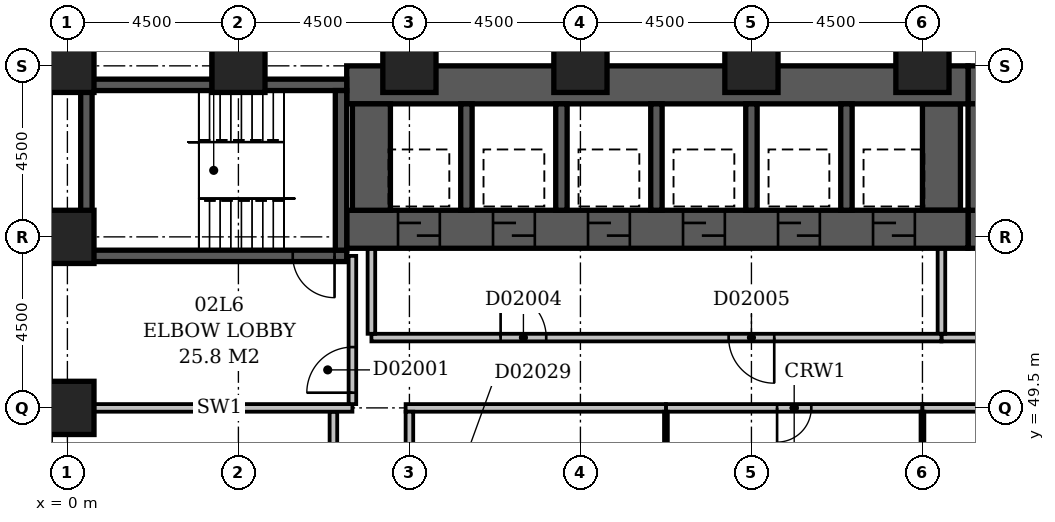
"""IFC4 building model, lengths in metres.
Left out: names, types, materials, properties, quantities, classifications, styles, units other than length and angle.
Written with IfcOpenShell. Run it as: python <this file> out.ifc"""

import sys

from ifc_helpers import new_model, si_unit, direction, frame, frame_2d, origin, origin_2d, place, context, subcontext, project, spatial, rectangle, extrude, element, fill, save


model = new_model("IFC4")
c1 = context("Model", 3, precision=1e-05, world=origin(), true_north=direction((0.0, 1.0)))
c2 = subcontext(c1, "Body", "Model", "MODEL_VIEW")
j1 = project(units=[si_unit("LENGTHUNIT", "METRE"), si_unit("PLANEANGLEUNIT", "RADIAN")], contexts=[c1])
p1 = place(None, origin())
s1 = spatial("IfcSite", under=j1, at=p1, CompositionType="ELEMENT")
p2 = place(p1, origin())
s2 = spatial("IfcBuilding", under=s1, at=p2, CompositionType="ELEMENT")
p3 = place(p2, frame((0.0, 0.0, 14.0)))
s3 = spatial("IfcBuildingStorey", under=s2, at=p3, CompositionType="ELEMENT", Elevation=14.0)
p4 = place(p3, frame((0.35, 53.5, -0.4), z_axis=(0.0, 0.0, 1.0), x_axis=(1.0, 0.0, 0.0)))
e1 = element("IfcWall", 1, at=p4, inside=s3, PredefinedType="SHEAR", context=c2, shape_type="SweptSolid", body=[
    extrude(rectangle(XDim=7.0, YDim=0.3, at=frame_2d((3.5, 0.0))), origin(), (0.0, 0.0, 1.0), 5.0),
])
p5 = place(p4, frame((5.58, 0.0, 0.4)))
e2 = element("IfcOpeningElement", 2, at=p5, cuts=e1, PredefinedType="OPENING", context=c2, shape_type="SweptSolid", body=[
    extrude(rectangle(XDim=1.1, YDim=2.1, at=frame_2d((0.55, 1.05))), frame((0.0, 0.162, 0.0), z_axis=(0.0, -1.0, 0.0), x_axis=(1.0, 0.0, 0.0)), (0.0, 0.0, 1.0), 0.324),
])
p6 = place(p3, frame((0.35, 58.0, -0.4), z_axis=(0.0, 0.0, 1.0), x_axis=(1.0, 0.0, 0.0)))
e3 = element("IfcWall", 3, at=p6, inside=s3, PredefinedType="SHEAR", context=c2, shape_type="SweptSolid", body=[
    extrude(rectangle(XDim=7.0, YDim=0.3, at=frame_2d((3.5, 0.0))), origin(), (0.0, 0.0, 1.0), 5.0),
])
for number, where, z_axis, x_axis in (
    (4, (0.5, 53.65, -0.4), (0.0, 0.0, 1.0), (0.0, 1.0, 0.0)),
    (5, (7.2, 53.65, -0.4), (0.0, 0.0, 1.0), (0.0, 1.0, 0.0)),
):
    element("IfcWall", number, at=place(p3, frame(where, z_axis=z_axis, x_axis=x_axis)), inside=s3, PredefinedType="SHEAR", context=c2, shape_type="SweptSolid", body=[
        extrude(rectangle(XDim=4.2, YDim=0.3, at=frame_2d((2.1, 0.0))), origin(), (0.0, 0.0, 1.0), 5.0),
    ])
p7 = place(p3, frame((7.35, 54.2, -0.4), z_axis=(0.0, 0.0, 1.0), x_axis=(1.0, 0.0, 0.0)))
e6 = element("IfcWall", 6, at=p7, inside=s3, PredefinedType="SHEAR", context=c2, shape_type="SweptSolid", body=[
    extrude(rectangle(XDim=16.35, YDim=1.0, at=frame_2d((8.175, 0.0))), origin(), (0.0, 0.0, 1.0), 5.0),
])
p8 = place(p7, frame((1.35, 0.0, 0.4)))
e7 = element("IfcOpeningElement", 7, at=p8, cuts=e6, PredefinedType="OPENING", context=c2, shape_type="SweptSolid", body=[
    extrude(rectangle(XDim=1.1, YDim=2.1, at=frame_2d((0.55, 1.05))), frame((0.0, 0.512, 0.0), z_axis=(0.0, -1.0, 0.0), x_axis=(1.0, 0.0, 0.0)), (0.0, 0.0, 1.0), 1.024),
])
p9 = place(p7, frame((3.85, 0.0, 0.4)))
e8 = element("IfcOpeningElement", 8, at=p9, cuts=e6, PredefinedType="OPENING", context=c2, shape_type="SweptSolid", body=[
    extrude(rectangle(XDim=1.1, YDim=2.1, at=frame_2d((0.55, 1.05))), frame((0.0, 0.512, 0.0), z_axis=(0.0, -1.0, 0.0), x_axis=(1.0, 0.0, 0.0)), (0.0, 0.0, 1.0), 1.024),
])
p10 = place(p7, frame((6.35, 0.0, 0.4)))
e9 = element("IfcOpeningElement", 9, at=p10, cuts=e6, PredefinedType="OPENING", context=c2, shape_type="SweptSolid", body=[
    extrude(rectangle(XDim=1.1, YDim=2.1, at=frame_2d((0.55, 1.05))), frame((0.0, 0.512, 0.0), z_axis=(0.0, -1.0, 0.0), x_axis=(1.0, 0.0, 0.0)), (0.0, 0.0, 1.0), 1.024),
])
p11 = place(p7, frame((8.85, 0.0, 0.4)))
e10 = element("IfcOpeningElement", 10, at=p11, cuts=e6, PredefinedType="OPENING", context=c2, shape_type="SweptSolid", body=[
    extrude(rectangle(XDim=1.1, YDim=2.1, at=frame_2d((0.55, 1.05))), frame((0.0, 0.512, 0.0), z_axis=(0.0, -1.0, 0.0), x_axis=(1.0, 0.0, 0.0)), (0.0, 0.0, 1.0), 1.024),
])
p12 = place(p7, frame((11.35, 0.0, 0.4)))
e11 = element("IfcOpeningElement", 11, at=p12, cuts=e6, PredefinedType="OPENING", context=c2, shape_type="SweptSolid", body=[
    extrude(rectangle(XDim=1.1, YDim=2.1, at=frame_2d((0.55, 1.05))), frame((0.0, 0.512, 0.0), z_axis=(0.0, -1.0, 0.0), x_axis=(1.0, 0.0, 0.0)), (0.0, 0.0, 1.0), 1.024),
])
p13 = place(p7, frame((13.85, 0.0, 0.4)))
e12 = element("IfcOpeningElement", 12, at=p13, cuts=e6, PredefinedType="OPENING", context=c2, shape_type="SweptSolid", body=[
    extrude(rectangle(XDim=1.1, YDim=2.1, at=frame_2d((0.55, 1.05))), frame((0.0, 0.512, 0.0), z_axis=(0.0, -1.0, 0.0), x_axis=(1.0, 0.0, 0.0)), (0.0, 0.0, 1.0), 1.024),
])
p14 = place(p3, frame((7.35, 58.0, -0.4), z_axis=(0.0, 0.0, 1.0), x_axis=(1.0, 0.0, 0.0)))
e13 = element("IfcWall", 13, at=p14, inside=s3, PredefinedType="SHEAR", context=c2, shape_type="SweptSolid", body=[
    extrude(rectangle(XDim=16.35, YDim=1.0, at=frame_2d((8.175, 0.0))), origin(), (0.0, 0.0, 1.0), 5.0),
])
p15 = place(p3, frame((8.0, 54.7, -0.4), z_axis=(0.0, 0.0, 1.0), x_axis=(0.0, 1.0, 0.0)))
e14 = element("IfcWall", 14, at=p15, inside=s3, PredefinedType="SHEAR", context=c2, shape_type="SweptSolid", body=[
    extrude(rectangle(XDim=2.8, YDim=1.0, at=frame_2d((1.4, 0.0))), origin(), (0.0, 0.0, 1.0), 5.0),
])
for number, where, z_axis, x_axis in (
    (15, (10.5, 54.7, -0.4), (0.0, 0.0, 1.0), (0.0, 1.0, 0.0)),
    (16, (13.0, 54.7, -0.4), (0.0, 0.0, 1.0), (0.0, 1.0, 0.0)),
    (17, (15.5, 54.7, -0.4), (0.0, 0.0, 1.0), (0.0, 1.0, 0.0)),
    (18, (18.0, 54.7, -0.4), (0.0, 0.0, 1.0), (0.0, 1.0, 0.0)),
    (19, (20.5, 54.7, -0.4), (0.0, 0.0, 1.0), (0.0, 1.0, 0.0)),
):
    element("IfcWall", number, at=place(p3, frame(where, z_axis=z_axis, x_axis=x_axis)), inside=s3, PredefinedType="SHEAR", context=c2, shape_type="SweptSolid", body=[
        extrude(rectangle(XDim=2.8, YDim=0.3, at=frame_2d((1.4, 0.0))), origin(), (0.0, 0.0, 1.0), 5.0),
    ])
p16 = place(p3, frame((23.0, 54.7, -0.4), z_axis=(0.0, 0.0, 1.0), x_axis=(0.0, 1.0, 0.0)))
e20 = element("IfcWall", 20, at=p16, inside=s3, PredefinedType="SHEAR", context=c2, shape_type="SweptSolid", body=[
    extrude(rectangle(XDim=2.8, YDim=1.0, at=frame_2d((1.4, 0.0))), origin(), (0.0, 0.0, 1.0), 5.0),
])
p17 = place(p3, frame((23.7, 54.2, -0.4), z_axis=(0.0, 0.0, 1.0), x_axis=(1.0, 0.0, 0.0)))
e21 = element("IfcWall", 21, at=p17, inside=s3, PredefinedType="SHEAR", context=c2, shape_type="SweptSolid", body=[
    extrude(rectangle(XDim=3.5, YDim=1.0, at=frame_2d((1.75, 0.0))), origin(), (0.0, 0.0, 1.0), 5.0),
])
p18 = place(p17, frame((1.2, 0.0, 0.4)))
e22 = element("IfcOpeningElement", 22, at=p18, cuts=e21, PredefinedType="OPENING", context=c2, shape_type="SweptSolid", body=[
    extrude(rectangle(XDim=1.1, YDim=2.1, at=frame_2d((0.55, 1.05))), frame((0.0, 0.512, 0.0), z_axis=(0.0, -1.0, 0.0), x_axis=(1.0, 0.0, 0.0)), (0.0, 0.0, 1.0), 1.024),
])
p19 = place(p3, frame((23.7, 58.0, -0.4), z_axis=(0.0, 0.0, 1.0), x_axis=(1.0, 0.0, 0.0)))
e23 = element("IfcWall", 23, at=p19, inside=s3, PredefinedType="SHEAR", context=c2, shape_type="SweptSolid", body=[
    extrude(rectangle(XDim=3.5, YDim=1.0, at=frame_2d((1.75, 0.0))), origin(), (0.0, 0.0, 1.0), 5.0),
])
p20 = place(p3, frame((24.2, 54.7, -0.4), z_axis=(0.0, 0.0, 1.0), x_axis=(0.0, 1.0, 0.0)))
e24 = element("IfcWall", 24, at=p20, inside=s3, PredefinedType="SHEAR", context=c2, shape_type="SweptSolid", body=[
    extrude(rectangle(XDim=2.8, YDim=1.0, at=frame_2d((1.4, 0.0))), origin(), (0.0, 0.0, 1.0), 5.0),
])
for number, where, z_axis, x_axis in (
    (25, (0.0, 49.5, -0.4), (0.0, 0.0, 1.0), (1.0, 0.0, 0.0)),
    (26, (0.0, 54.0, -0.4), (0.0, 0.0, 1.0), (1.0, 0.0, 0.0)),
    (27, (0.0, 58.5, -0.4), (0.0, 0.0, 1.0), (1.0, 0.0, 0.0)),
    (28, (4.5, 58.5, -0.4), (0.0, 0.0, 1.0), (1.0, 0.0, 0.0)),
    (29, (9.0, 58.5, -0.4), (0.0, 0.0, 1.0), (1.0, 0.0, 0.0)),
    (30, (13.5, 58.5, -0.4), (0.0, 0.0, 1.0), (1.0, 0.0, 0.0)),
    (31, (18.0, 58.5, -0.4), (0.0, 0.0, 1.0), (1.0, 0.0, 0.0)),
    (32, (22.5, 58.5, -0.4), (0.0, 0.0, 1.0), (1.0, 0.0, 0.0)),
):
    element("IfcColumn", number, at=place(p3, frame(where, z_axis=z_axis, x_axis=x_axis)), inside=s3, PredefinedType="COLUMN", context=c2, shape_type="SweptSolid", body=[
        extrude(rectangle(XDim=1.4, YDim=1.4, at=origin_2d()), origin(), (0.0, 0.0, 1.0), 5.0),
    ])
p21 = place(p3, frame((8.0, 51.35, 0.0), z_axis=(0.0, 0.0, 1.0), x_axis=(1.0, 0.0, 0.0)))
e33 = element("IfcWall", 33, at=p21, inside=s3, PredefinedType="PARTITIONING", context=c2, shape_type="SweptSolid", body=[
    extrude(rectangle(XDim=15.0, YDim=0.2, at=frame_2d((7.5, 0.0))), origin(), (0.0, 0.0, 1.0), 4.6),
])
p22 = place(p21, frame((3.4, 0.0, 0.0)))
e34 = element("IfcOpeningElement", 34, at=p22, cuts=e33, PredefinedType="OPENING", context=c2, shape_type="SweptSolid", body=[
    extrude(rectangle(XDim=1.2, YDim=2.1, at=frame_2d((0.6, 1.05))), frame((0.0, 0.112, 0.0), z_axis=(0.0, -1.0, 0.0), x_axis=(1.0, 0.0, 0.0)), (0.0, 0.0, 1.0), 0.224),
])
p23 = place(p21, frame((9.4, 0.0, 0.0)))
e35 = element("IfcOpeningElement", 35, at=p23, cuts=e33, PredefinedType="OPENING", context=c2, shape_type="SweptSolid", body=[
    extrude(rectangle(XDim=1.2, YDim=2.1, at=frame_2d((0.6, 1.05))), frame((0.0, 0.112, 0.0), z_axis=(0.0, -1.0, 0.0), x_axis=(1.0, 0.0, 0.0)), (0.0, 0.0, 1.0), 0.224),
])
for number, where, z_axis, x_axis in (
    (36, (23.0, 51.45, 0.0), (0.0, 0.0, 1.0), (0.0, 1.0, 0.0)),
    (37, (8.0, 51.45, 0.0), (0.0, 0.0, 1.0), (0.0, 1.0, 0.0)),
):
    element("IfcWall", number, at=place(p3, frame(where, z_axis=z_axis, x_axis=x_axis)), inside=s3, PredefinedType="PARTITIONING", context=c2, shape_type="SweptSolid", body=[
        extrude(rectangle(XDim=2.23, YDim=0.2, at=frame_2d((1.115, 0.0))), origin(), (0.0, 0.0, 1.0), 4.6),
    ])
p24 = place(p3, frame((23.0, 51.35, 0.0), z_axis=(0.0, 0.0, 1.0), x_axis=(1.0, 0.0, 0.0)))
e38 = element("IfcWall", 38, at=p24, inside=s3, PredefinedType="PARTITIONING", context=c2, shape_type="SweptSolid", body=[
    extrude(rectangle(XDim=4.8, YDim=0.2, at=frame_2d((2.4, 0.0))), origin(), (0.0, 0.0, 1.0), 4.6),
])
p25 = place(p24, frame((1.65, 0.0, 0.0)))
e39 = element("IfcOpeningElement", 39, at=p25, cuts=e38, PredefinedType="OPENING", context=c2, shape_type="SweptSolid", body=[
    extrude(rectangle(XDim=1.2, YDim=2.1, at=frame_2d((0.6, 1.05))), frame((0.0, 0.112, 0.0), z_axis=(0.0, -1.0, 0.0), x_axis=(1.0, 0.0, 0.0)), (0.0, 0.0, 1.0), 0.224),
])
p26 = place(p3, frame((0.5, 49.5, 0.0), z_axis=(0.0, 0.0, 1.0), x_axis=(1.0, 0.0, 0.0)))
e40 = element("IfcWall", 40, at=p26, inside=s3, PredefinedType="PARTITIONING", context=c2, shape_type="SweptSolid", body=[
    extrude(rectangle(XDim=7.0, YDim=0.2, at=frame_2d((3.5, 0.0))), origin(), (0.0, 0.0, 1.0), 4.6),
])
p27 = place(p3, frame((7.5, 49.6, 0.0), z_axis=(0.0, 0.0, 1.0), x_axis=(0.0, 1.0, 0.0)))
e41 = element("IfcWall", 41, at=p27, inside=s3, PredefinedType="PARTITIONING", context=c2, shape_type="SweptSolid", body=[
    extrude(rectangle(XDim=3.9, YDim=0.2, at=frame_2d((1.95, 0.0))), origin(), (0.0, 0.0, 1.0), 4.6),
])
p28 = place(p27, frame((0.3, 0.0, 0.0)))
e42 = element("IfcOpeningElement", 42, at=p28, cuts=e41, PredefinedType="OPENING", context=c2, shape_type="SweptSolid", body=[
    extrude(rectangle(XDim=1.2, YDim=2.1, at=frame_2d((0.6, 1.05))), frame((0.0, 0.112, 0.0), z_axis=(0.0, -1.0, 0.0), x_axis=(1.0, 0.0, 0.0)), (0.0, 0.0, 1.0), 0.224),
])
p29 = place(p3, frame((9.0, 42.5, 0.0), z_axis=(0.0, 0.0, 1.0), x_axis=(0.0, 1.0, 0.0)))
e43 = element("IfcWall", 43, at=p29, inside=s3, PredefinedType="PARTITIONING", context=c2, shape_type="SweptSolid", body=[
    extrude(rectangle(XDim=6.9, YDim=0.2, at=frame_2d((3.45, 0.0))), origin(), (0.0, 0.0, 1.0), 4.6),
])
p30 = place(p29, frame((2.975, 0.0, 0.0)))
e44 = element("IfcOpeningElement", 44, at=p30, cuts=e43, PredefinedType="OPENING", context=c2, shape_type="SweptSolid", body=[
    extrude(rectangle(XDim=0.9, YDim=2.1, at=frame_2d((0.45, 1.05))), frame((0.0, 0.112, 0.0), z_axis=(0.0, -1.0, 0.0), x_axis=(1.0, 0.0, 0.0)), (0.0, 0.0, 1.0), 0.224),
])
p31 = place(p3, frame((22.5, 42.55, 0.0), z_axis=(0.0, 0.0, 1.0), x_axis=(0.0, 1.0, 0.0)))
e45 = element("IfcWall", 45, at=p31, inside=s3, PredefinedType="PARTITIONING", context=c2, shape_type="SweptSolid", body=[
    extrude(rectangle(XDim=6.85, YDim=0.1, at=frame_2d((3.425, 0.0))), origin(), (0.0, 0.0, 1.0), 4.6),
])
p32 = place(p3, frame((7.0, 49.4, 0.0), z_axis=(0.0, 0.0, 1.0), x_axis=(0.0, -1.0, 0.0)))
e46 = element("IfcWall", 46, at=p32, inside=s3, PredefinedType="PARTITIONING", context=c2, shape_type="SweptSolid", body=[
    extrude(rectangle(XDim=6.4, YDim=0.2, at=frame_2d((3.2, 0.0))), origin(), (0.0, 0.0, 1.0), 4.6),
])
p33 = place(p32, frame((2.775, 0.0, 0.0)))
e47 = element("IfcOpeningElement", 47, at=p33, cuts=e46, PredefinedType="OPENING", context=c2, shape_type="SweptSolid", body=[
    extrude(rectangle(XDim=0.9, YDim=2.1, at=frame_2d((0.45, 1.05))), frame((0.0, 0.112, 0.0), z_axis=(0.0, -1.0, 0.0), x_axis=(1.0, 0.0, 0.0)), (0.0, 0.0, 1.0), 0.224),
])
p34 = place(p3, frame((8.9, 49.5, 0.0), z_axis=(0.0, 0.0, 1.0), x_axis=(1.0, 0.0, 0.0)))
e48 = element("IfcWall", 48, at=p34, inside=s3, PredefinedType="PARTITIONING", context=c2, shape_type="SweptSolid", body=[
    extrude(rectangle(XDim=6.85, YDim=0.2, at=frame_2d((3.425, 0.0))), origin(), (0.0, 0.0, 1.0), 4.6),
])
p35 = place(p3, frame((15.75, 49.4, 0.0), z_axis=(0.0, 0.0, 1.0), x_axis=(0.0, -1.0, 0.0)))
e49 = element("IfcWall", 49, at=p35, inside=s3, PredefinedType="PARTITIONING", context=c2, shape_type="SweptSolid", body=[
    extrude(rectangle(XDim=6.95, YDim=0.1, at=frame_2d((3.475, 0.0))), origin(), (0.0, 0.0, 1.0), 4.6),
])
p36 = place(p3, frame((15.75, 49.5, 0.0), z_axis=(0.0, 0.0, 1.0), x_axis=(1.0, 0.0, 0.0)))
e50 = element("IfcWall", 50, at=p36, inside=s3, PredefinedType="PARTITIONING", context=c2, shape_type="SweptSolid", body=[
    extrude(rectangle(XDim=6.75, YDim=0.2, at=frame_2d((3.375, 0.0))), origin(), (0.0, 0.0, 1.0), 4.6),
])
p37 = place(p36, frame((2.925, 0.0, 0.0)))
e51 = element("IfcOpeningElement", 51, at=p37, cuts=e50, PredefinedType="OPENING", context=c2, shape_type="SweptSolid", body=[
    extrude(rectangle(XDim=0.9, YDim=2.1, at=frame_2d((0.45, 1.05))), frame((0.0, 0.112, 0.0), z_axis=(0.0, -1.0, 0.0), x_axis=(1.0, 0.0, 0.0)), (0.0, 0.0, 1.0), 0.224),
])
p38 = place(p3, frame((22.5, 49.5, 0.0), z_axis=(0.0, 0.0, 1.0), x_axis=(1.0, 0.0, 0.0)))
e52 = element("IfcWall", 52, at=p38, inside=s3, PredefinedType="PARTITIONING", context=c2, shape_type="SweptSolid", body=[
    extrude(rectangle(XDim=29.9, YDim=0.2, at=frame_2d((14.95, 0.0))), origin(), (0.0, 0.0, 1.0), 4.6),
])
p39 = place(p38, frame((14.125, 0.0, 0.0)))
e53 = element("IfcOpeningElement", 53, at=p39, cuts=e52, PredefinedType="OPENING", context=c2, shape_type="SweptSolid", body=[
    extrude(rectangle(XDim=1.8, YDim=2.4, at=frame_2d((0.9, 1.2))), frame((0.0, 0.112, 0.0), z_axis=(0.0, -1.0, 0.0), x_axis=(1.0, 0.0, 0.0)), (0.0, 0.0, 1.0), 0.224),
])
p40 = place(p28, origin())
e54 = element("IfcDoor", 54, at=p40, inside=s3, OperationType="SINGLE_SWING_LEFT", PredefinedType="DOOR", context=c2, shape_type="SweptSolid", body=[
    extrude(rectangle(XDim=1.2, YDim=2.1, at=frame_2d((0.6, 1.05))), frame((0.0, 0.025, 0.0), z_axis=(0.0, -1.0, 0.0), x_axis=(1.0, 0.0, 0.0)), (0.0, 0.0, 1.0), 0.05),
])
fill(e42, e54)
p41 = place(p8, origin())
e55 = element("IfcDoor", 55, at=p41, inside=s3, OperationType="SLIDING_TO_LEFT", PredefinedType="DOOR", context=c2, shape_type="SweptSolid", body=[
    extrude(rectangle(XDim=1.1, YDim=2.1, at=frame_2d((0.55, 1.05))), frame((0.0, 0.025, 0.0), z_axis=(0.0, -1.0, 0.0), x_axis=(1.0, 0.0, 0.0)), (0.0, 0.0, 1.0), 0.05),
])
fill(e7, e55)
p42 = place(p9, origin())
e56 = element("IfcDoor", 56, at=p42, inside=s3, OperationType="SLIDING_TO_LEFT", PredefinedType="DOOR", context=c2, shape_type="SweptSolid", body=[
    extrude(rectangle(XDim=1.1, YDim=2.1, at=frame_2d((0.55, 1.05))), frame((0.0, 0.025, 0.0), z_axis=(0.0, -1.0, 0.0), x_axis=(1.0, 0.0, 0.0)), (0.0, 0.0, 1.0), 0.05),
])
fill(e8, e56)
p43 = place(p10, origin())
e57 = element("IfcDoor", 57, at=p43, inside=s3, OperationType="SLIDING_TO_LEFT", PredefinedType="DOOR", context=c2, shape_type="SweptSolid", body=[
    extrude(rectangle(XDim=1.1, YDim=2.1, at=frame_2d((0.55, 1.05))), frame((0.0, 0.025, 0.0), z_axis=(0.0, -1.0, 0.0), x_axis=(1.0, 0.0, 0.0)), (0.0, 0.0, 1.0), 0.05),
])
fill(e9, e57)
p44 = place(p11, origin())
e58 = element("IfcDoor", 58, at=p44, inside=s3, OperationType="SLIDING_TO_LEFT", PredefinedType="DOOR", context=c2, shape_type="SweptSolid", body=[
    extrude(rectangle(XDim=1.1, YDim=2.1, at=frame_2d((0.55, 1.05))), frame((0.0, 0.025, 0.0), z_axis=(0.0, -1.0, 0.0), x_axis=(1.0, 0.0, 0.0)), (0.0, 0.0, 1.0), 0.05),
])
fill(e10, e58)
p45 = place(p12, origin())
e59 = element("IfcDoor", 59, at=p45, inside=s3, OperationType="SLIDING_TO_LEFT", PredefinedType="DOOR", context=c2, shape_type="SweptSolid", body=[
    extrude(rectangle(XDim=1.1, YDim=2.1, at=frame_2d((0.55, 1.05))), frame((0.0, 0.025, 0.0), z_axis=(0.0, -1.0, 0.0), x_axis=(1.0, 0.0, 0.0)), (0.0, 0.0, 1.0), 0.05),
])
fill(e11, e59)
p46 = place(p13, origin())
e60 = element("IfcDoor", 60, at=p46, inside=s3, OperationType="SLIDING_TO_LEFT", PredefinedType="DOOR", context=c2, shape_type="SweptSolid", body=[
    extrude(rectangle(XDim=1.1, YDim=2.1, at=frame_2d((0.55, 1.05))), frame((0.0, 0.025, 0.0), z_axis=(0.0, -1.0, 0.0), x_axis=(1.0, 0.0, 0.0)), (0.0, 0.0, 1.0), 0.05),
])
fill(e12, e60)
p47 = place(p22, origin())
e61 = element("IfcDoor", 61, at=p47, inside=s3, OperationType="SINGLE_SWING_LEFT", PredefinedType="DOOR", context=c2, shape_type="SweptSolid", body=[
    extrude(rectangle(XDim=1.2, YDim=2.1, at=frame_2d((0.6, 1.05))), frame((0.0, 0.025, 0.0), z_axis=(0.0, -1.0, 0.0), x_axis=(1.0, 0.0, 0.0)), (0.0, 0.0, 1.0), 0.05),
])
fill(e34, e61)
p48 = place(p23, origin())
e62 = element("IfcDoor", 62, at=p48, inside=s3, OperationType="SINGLE_SWING_RIGHT", PredefinedType="DOOR", context=c2, shape_type="SweptSolid", body=[
    extrude(rectangle(XDim=1.2, YDim=2.1, at=frame_2d((0.6, 1.05))), frame((0.0, 0.025, 0.0), z_axis=(0.0, -1.0, 0.0), x_axis=(1.0, 0.0, 0.0)), (0.0, 0.0, 1.0), 0.05),
])
fill(e35, e62)
p49 = place(p5, origin())
e63 = element("IfcDoor", 63, at=p49, inside=s3, OperationType="SINGLE_SWING_RIGHT", PredefinedType="DOOR", context=c2, shape_type="SweptSolid", body=[
    extrude(rectangle(XDim=1.1, YDim=2.1, at=frame_2d((0.55, 1.05))), frame((0.0, 0.025, 0.0), z_axis=(0.0, -1.0, 0.0), x_axis=(1.0, 0.0, 0.0)), (0.0, 0.0, 1.0), 0.05),
])
fill(e2, e63)
p50 = place(p37, frame((0.9, 0.0, 0.0), z_axis=(0.0, 0.0, 1.0), x_axis=(-1.0, 0.0, 0.0)))
e64 = element("IfcDoor", 64, at=p50, inside=s3, OperationType="SINGLE_SWING_RIGHT", PredefinedType="DOOR", context=c2, shape_type="SweptSolid", body=[
    extrude(rectangle(XDim=0.9, YDim=2.1, at=frame_2d((0.45, 1.05))), frame((0.0, 0.025, 0.0), z_axis=(0.0, -1.0, 0.0), x_axis=(1.0, 0.0, 0.0)), (0.0, 0.0, 1.0), 0.05),
])
fill(e51, e64)
save(model, sys.argv[1])
